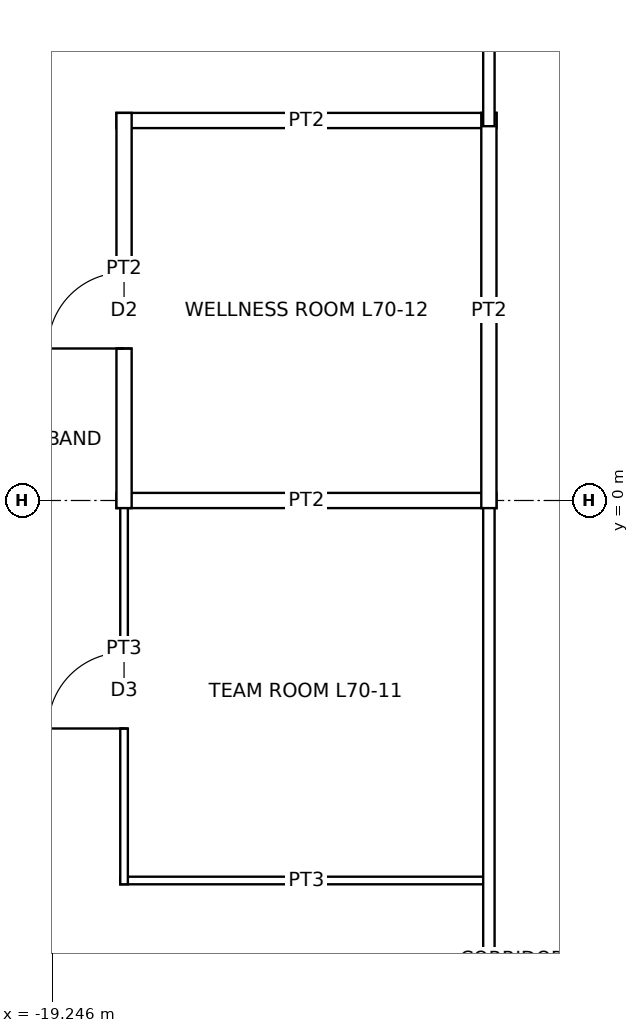
"""IFC4 building model, lengths in metres.
Left out: names, types, materials, properties, quantities, classifications, styles, units other than length and angle.
Written with IfcOpenShell. Run it as: python <this file> out.ifc"""

import sys

from ifc_helpers import new_model, si_unit, direction, frame, frame_2d, origin, place, context, subcontext, project, spatial, rectangle, extrude, element, fill, save


model = new_model("IFC4")
c1 = context("Model", 3, precision=1e-05, world=origin(), true_north=direction((0.0, 1.0)))
c2 = subcontext(c1, "Body", "Model", "MODEL_VIEW")
j1 = project(units=[si_unit("LENGTHUNIT", "METRE"), si_unit("PLANEANGLEUNIT", "RADIAN")], contexts=[c1])
p1 = place(None, origin())
s1 = spatial("IfcSite", under=j1, at=p1, CompositionType="ELEMENT")
p2 = place(p1, origin())
s2 = spatial("IfcBuilding", under=s1, at=p2, CompositionType="ELEMENT")
p3 = place(p2, frame((0.0, 0.0, 315.9)))
s3 = spatial("IfcBuildingStorey", under=s2, at=p3, CompositionType="ELEMENT", Elevation=315.9)
p4 = place(p3, frame((-18.35, -5.0, 0.0), z_axis=(0.0, 0.0, 1.0), x_axis=(1.0, 0.0, 0.0)))
e1 = element("IfcWall", 1, at=p4, inside=s3, PredefinedType="PARTITIONING", context=c2, shape_type="SweptSolid", body=[
    extrude(rectangle(XDim=4.9, YDim=0.1, at=frame_2d((2.45, 0.0))), origin(), (0.0, 0.0, 1.0), 3.85),
])
p5 = place(p3, frame((-18.4, 0.0, 0.0), z_axis=(0.0, 0.0, 1.0), x_axis=(1.0, 0.0, 0.0)))
e2 = element("IfcWall", 2, at=p5, inside=s3, PredefinedType="PARTITIONING", context=c2, shape_type="SweptSolid", body=[
    extrude(rectangle(XDim=5.0, YDim=0.2, at=frame_2d((2.5, 0.0))), origin(), (0.0, 0.0, 1.0), 3.243),
])
p6 = place(p3, frame((-18.4, 5.0, 0.0), z_axis=(0.0, 0.0, 1.0), x_axis=(1.0, 0.0, 0.0)))
e3 = element("IfcWall", 3, at=p6, inside=s3, PredefinedType="PARTITIONING", context=c2, shape_type="SweptSolid", body=[
    extrude(rectangle(XDim=5.0, YDim=0.2, at=frame_2d((2.5, 0.0))), origin(), (0.0, 0.0, 1.0), 3.85),
])
p7 = place(p3, frame((-18.3, -5.05, 0.0), z_axis=(0.0, 0.0, 1.0), x_axis=(0.0, 1.0, 0.0)))
e4 = element("IfcWall", 4, at=p7, inside=s3, PredefinedType="PARTITIONING", context=c2, shape_type="SweptSolid", body=[
    extrude(rectangle(XDim=5.1, YDim=0.1, at=frame_2d((2.55, 0.0))), origin(), (0.0, 0.0, 1.0), 3.85),
])
p8 = place(p7, frame((2.05, 0.0, 0.0)))
e5 = element("IfcOpeningElement", 5, at=p8, cuts=e4, PredefinedType="OPENING", context=c2, shape_type="SweptSolid", body=[
    extrude(rectangle(XDim=1.0, YDim=2.1, at=frame_2d((0.5, 1.05))), frame((0.0, 0.06, 0.0), z_axis=(0.0, -1.0, 0.0), x_axis=(1.0, 0.0, 0.0)), (0.0, 0.0, 1.0), 0.12),
])
p9 = place(p3, frame((-18.3, -0.1, 0.0), z_axis=(0.0, 0.0, 1.0), x_axis=(0.0, 1.0, 0.0)))
e6 = element("IfcWall", 6, at=p9, inside=s3, PredefinedType="PARTITIONING", context=c2, shape_type="SweptSolid", body=[
    extrude(rectangle(XDim=5.2, YDim=0.2, at=frame_2d((2.6, 0.0))), origin(), (0.0, 0.0, 1.0), 3.85),
])
p10 = place(p9, frame((2.1, 0.0, 0.0)))
e7 = element("IfcOpeningElement", 7, at=p10, cuts=e6, PredefinedType="OPENING", context=c2, shape_type="SweptSolid", body=[
    extrude(rectangle(XDim=1.0, YDim=2.1, at=frame_2d((0.5, 1.05))), frame((0.0, 0.11, 0.0), z_axis=(0.0, -1.0, 0.0), x_axis=(1.0, 0.0, 0.0)), (0.0, 0.0, 1.0), 0.22),
])
p11 = place(p3, frame((-13.5, -13.575, 0.0), z_axis=(0.0, 0.0, 1.0), x_axis=(0.0, 1.0, 0.0)))
e8 = element("IfcWall", 8, at=p11, inside=s3, PredefinedType="PARTITIONING", context=c2, shape_type="SweptSolid", body=[
    extrude(rectangle(XDim=13.65, YDim=0.15, at=frame_2d((6.825, 0.0))), origin(), (0.0, 0.0, 1.0), 3.85),
])
p12 = place(p3, frame((-13.5, -0.1, 0.0), z_axis=(0.0, 0.0, 1.0), x_axis=(0.0, 1.0, 0.0)))
e9 = element("IfcWall", 9, at=p12, inside=s3, PredefinedType="PARTITIONING", context=c2, shape_type="SweptSolid", body=[
    extrude(rectangle(XDim=5.2, YDim=0.2, at=frame_2d((2.6, 0.0))), origin(), (0.0, 0.0, 1.0), 3.85),
])
p13 = place(p3, frame((-13.5, 4.925, 0.0), z_axis=(0.0, 0.0, 1.0), x_axis=(0.0, 1.0, 0.0)))
e10 = element("IfcWall", 10, at=p13, inside=s3, PredefinedType="PARTITIONING", context=c2, shape_type="SweptSolid", body=[
    extrude(rectangle(XDim=7.15, YDim=0.15, at=frame_2d((3.575, 0.0))), origin(), (0.0, 0.0, 1.0), 3.85),
])
p14 = place(p8, origin())
e11 = element("IfcDoor", 11, at=p14, inside=s3, OperationType="SINGLE_SWING_LEFT", PredefinedType="DOOR", context=c2, shape_type="SweptSolid", body=[
    extrude(rectangle(XDim=1.0, YDim=2.1, at=frame_2d((0.5, 1.05))), frame((0.0, 0.025, 0.0), z_axis=(0.0, -1.0, 0.0), x_axis=(1.0, 0.0, 0.0)), (0.0, 0.0, 1.0), 0.05),
])
fill(e5, e11)
p15 = place(p10, origin())
e12 = element("IfcDoor", 12, at=p15, inside=s3, OperationType="SINGLE_SWING_LEFT", PredefinedType="DOOR", context=c2, shape_type="SweptSolid", body=[
    extrude(rectangle(XDim=1.0, YDim=2.1, at=frame_2d((0.5, 1.05))), frame((0.0, 0.025, 0.0), z_axis=(0.0, -1.0, 0.0), x_axis=(1.0, 0.0, 0.0)), (0.0, 0.0, 1.0), 0.05),
])
fill(e7, e12)
save(model, sys.argv[1])
